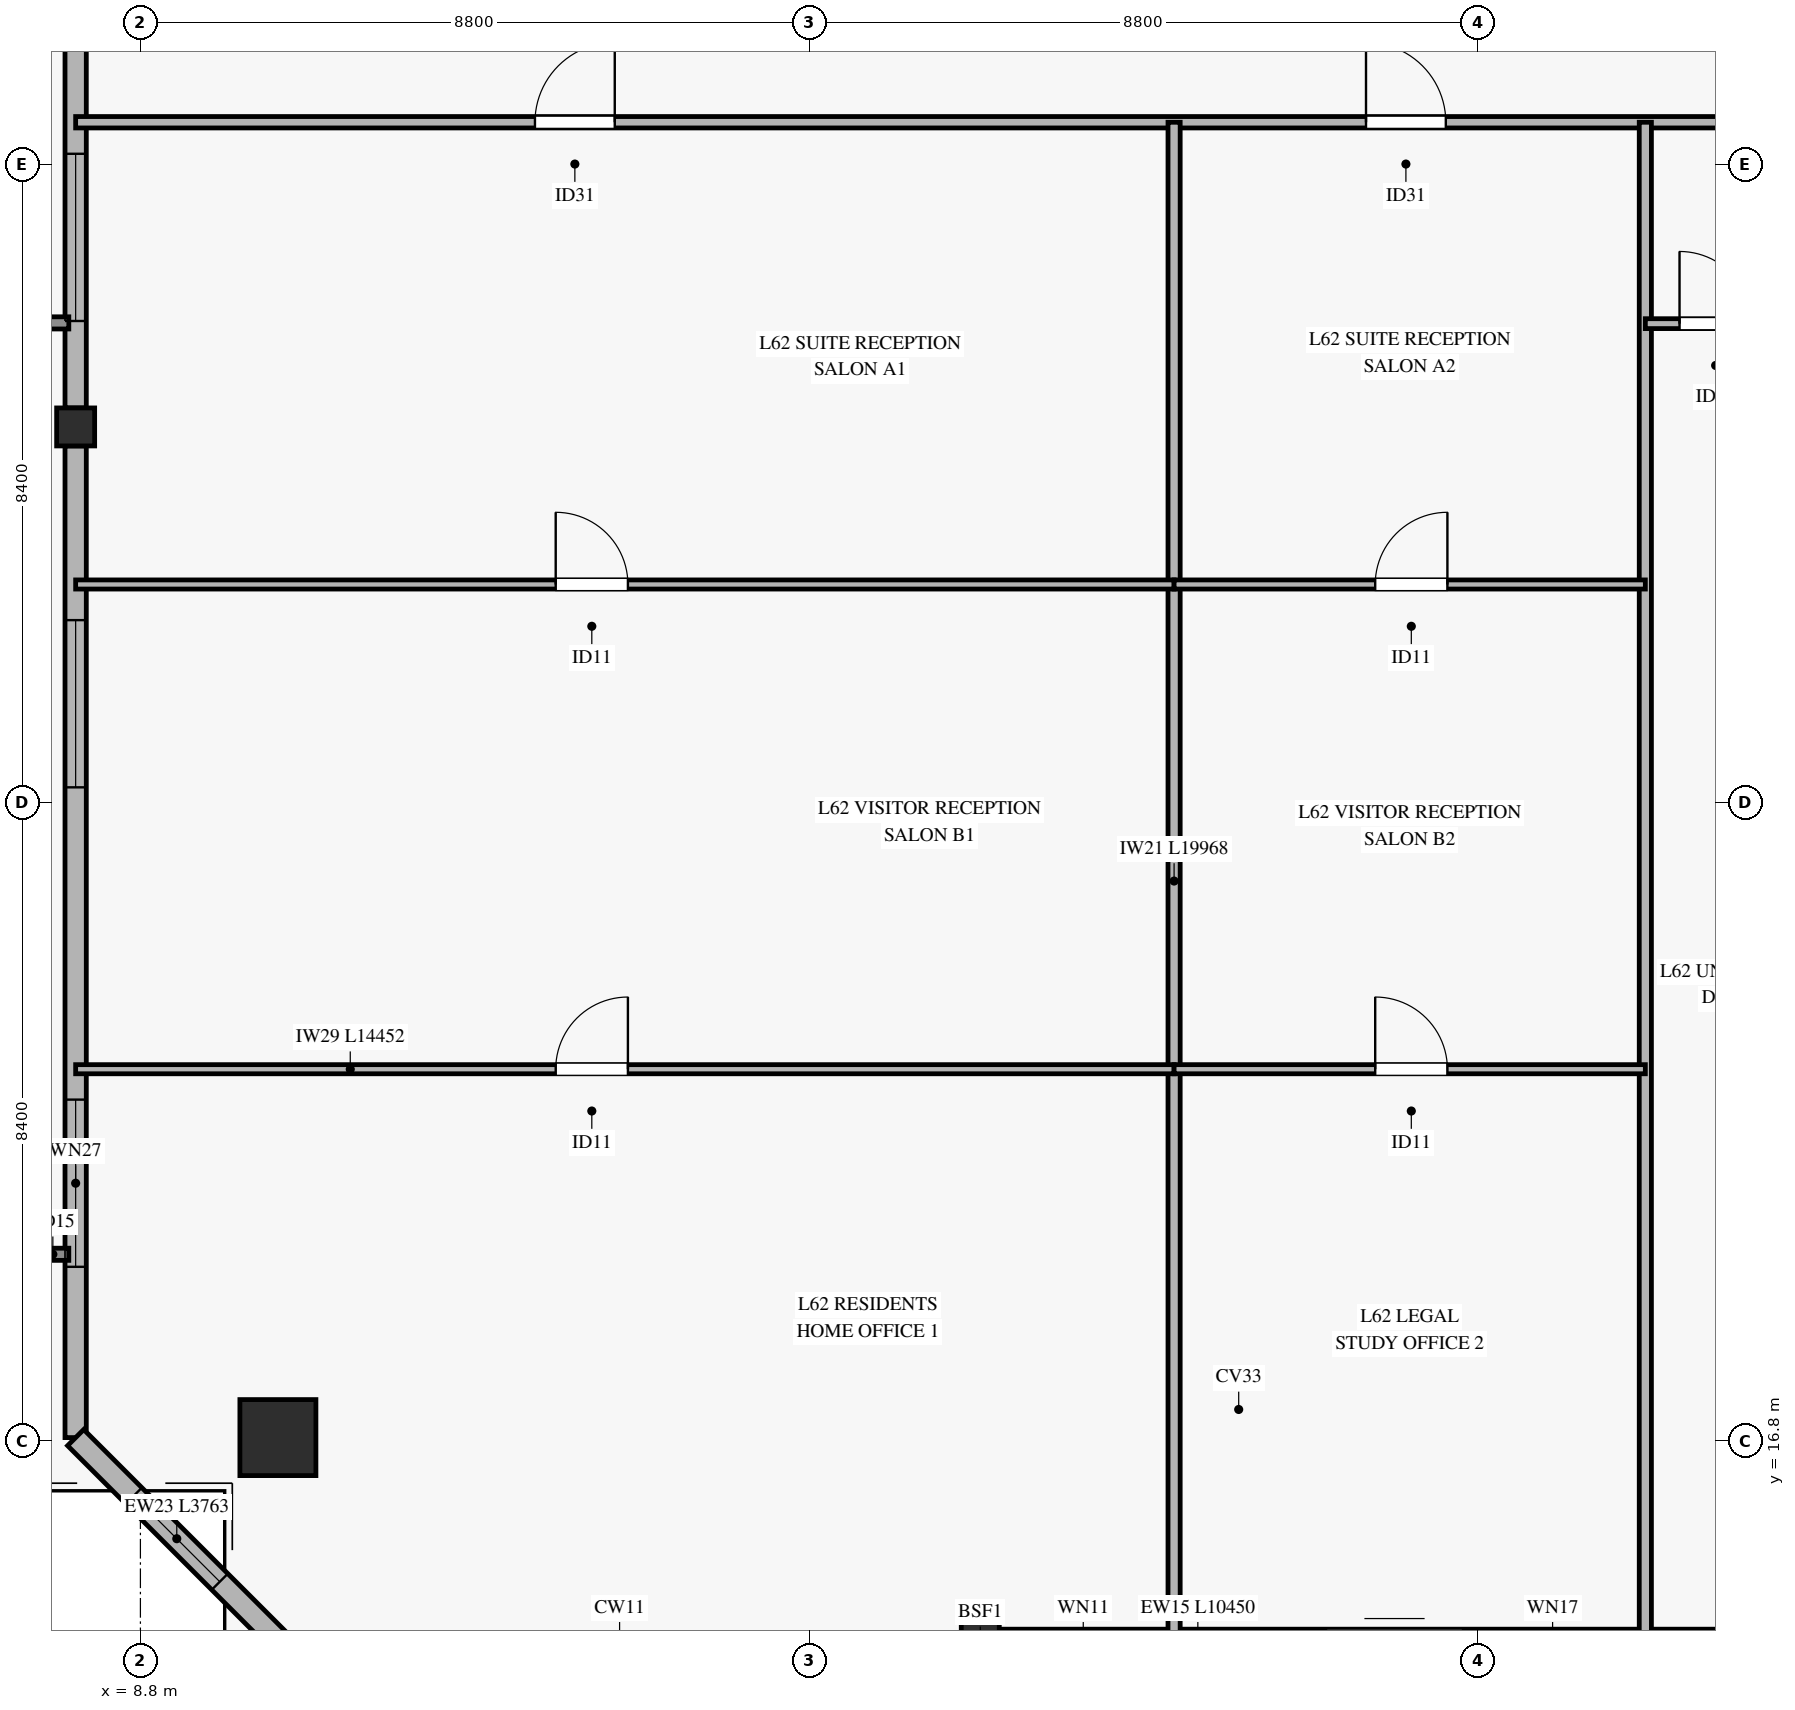
"""IFC4 building model, lengths in metres.
Left out: names, types, materials, properties, quantities, classifications, styles, units other than length and angle.
Written with IfcOpenShell. Run it as: python <this file> out.ifc"""

import sys

from ifc_helpers import new_model, si_unit, direction, frame, frame_2d, origin, origin_2d, place, context, subcontext, project, spatial, rectangle, hollow_rectangle, extrude, source, transform, mapped, element, fill, save


model = new_model("IFC4")
c1 = context("Model", 3, precision=1e-05, world=origin(), true_north=direction((0.0, 1.0)))
c2 = subcontext(c1, "Body", "Model", "MODEL_VIEW")
j1 = project(units=[si_unit("LENGTHUNIT", "METRE"), si_unit("PLANEANGLEUNIT", "RADIAN")], contexts=[c1])
p1 = place(None, origin())
s1 = spatial("IfcSite", under=j1, at=p1, CompositionType="ELEMENT")
p2 = place(p1, origin())
s2 = spatial("IfcBuilding", under=s1, at=p2, CompositionType="ELEMENT")
p3 = place(p2, frame((0.0, 0.0, 245.1)))
s3 = spatial("IfcBuildingStorey", under=s2, at=p3, CompositionType="ELEMENT", Elevation=245.1)
m1 = source(origin(), c2, "Body", "SweptSolid", [
    extrude(hollow_rectangle(XDim=1.0, YDim=1.0, WallThickness=0.045, at=origin_2d()), origin(), (0.0, 0.0, 1.0), 3.326),
])
p4 = place(p3, frame((10.609, 16.843, 0.0), z_axis=(0.111274962345, 0.266076344656, 0.957507838908), x_axis=(-0.922571641766, 0.38582582315, 0.0)))
e1 = element("IfcColumn", 1, at=p4, inside=s3, PredefinedType="COLUMN", context=c2, shape_type="MappedRepresentation", body=[
    mapped(m1, transform((0.0, 0.0, 0.0), x_axis=(1.0, 0.0, 0.0), y_axis=(0.0, 1.0, 0.0), z_axis=(0.0, 0.0, 1.0), scale=1.0)),
])
m2 = source(origin(), c2, "Body", "SweptSolid", [
    extrude(hollow_rectangle(XDim=0.5, YDim=0.5, WallThickness=0.024, at=origin_2d()), origin(), (0.0, 0.0, 1.0), 3.318),
])
p5 = place(p3, frame((19.85, 14.182, 0.0), z_axis=(0.0, 0.280624348342, 0.959817678061), x_axis=(-1.0, 0.0, 0.0)))
e2 = element("IfcColumn", 2, at=p5, inside=s3, PredefinedType="COLUMN", context=c2, shape_type="MappedRepresentation", body=[
    mapped(m2, transform((0.0, 0.0, 0.0), x_axis=(1.0, 0.0, 0.0), y_axis=(0.0, 1.0, 0.0), z_axis=(0.0, 0.0, 1.0), scale=1.0)),
])
m3 = source(origin(), c2, "Body", "SweptSolid", [
    extrude(hollow_rectangle(XDim=0.5, YDim=0.5, WallThickness=0.024, at=origin_2d()), origin(), (0.0, 0.0, 1.0), 3.245),
])
p6 = place(p3, frame((7.948, 30.141, 0.0), z_axis=(0.128183322743, 0.143529213493, 0.981309533554), x_axis=(-0.745854424638, 0.66610898301, 0.0)))
e3 = element("IfcColumn", 3, at=p6, inside=s3, PredefinedType="COLUMN", context=c2, shape_type="MappedRepresentation", body=[
    mapped(m3, transform((0.0, 0.0, 0.0), x_axis=(1.0, 0.0, 0.0), y_axis=(0.0, 1.0, 0.0), z_axis=(0.0, 0.0, 1.0), scale=1.0)),
])
p7 = place(p3, frame((20.1, 14.182, 0.0), z_axis=(0.0, 0.0, 1.0), x_axis=(1.0, 0.0, 0.0)))
e4 = element("IfcWall", 4, at=p7, inside=s3, PredefinedType="SOLIDWALL", context=c2, shape_type="SweptSolid", body=[
    extrude(rectangle(XDim=10.45, YDim=0.28, at=frame_2d((5.225, 0.0))), origin(), (0.0, 0.0, 1.0), 2.815),
])
p8 = place(p7, frame((4.3, 0.0, 0.0)))
e5 = element("IfcOpeningElement", 5, at=p8, cuts=e4, PredefinedType="OPENING", context=c2, shape_type="SweptSolid", body=[
    extrude(rectangle(XDim=1.8, YDim=2.25, at=frame_2d((0.9, 1.125))), frame((0.0, 0.15, 0.0), z_axis=(0.0, -1.0, 0.0), x_axis=(1.0, 0.0, 0.0)), (0.0, 0.0, 1.0), 0.3),
])
p9 = place(p7, frame((0.505, 0.0, 0.45)))
e6 = element("IfcOpeningElement", 6, at=p9, cuts=e4, PredefinedType="OPENING", context=c2, shape_type="SweptSolid", body=[
    extrude(rectangle(XDim=1.2, YDim=2.0, at=frame_2d((0.6, 1.0))), frame((0.0, 0.15, 0.0), z_axis=(0.0, -1.0, 0.0), x_axis=(1.0, 0.0, 0.0)), (0.0, 0.0, 1.0), 0.3),
])
p10 = place(p7, frame((6.48, 0.0, 0.45)))
e7 = element("IfcOpeningElement", 7, at=p10, cuts=e4, PredefinedType="OPENING", context=c2, shape_type="SweptSolid", body=[
    extrude(rectangle(XDim=1.6, YDim=2.0, at=frame_2d((0.8, 1.0))), frame((0.0, 0.15, 0.0), z_axis=(0.0, -1.0, 0.0), x_axis=(1.0, 0.0, 0.0)), (0.0, 0.0, 1.0), 0.3),
])
p11 = place(p3, frame((7.948, 16.843, 0.0), z_axis=(0.0, 0.0, 1.0), x_axis=(0.0, 1.0, 0.0)))
e8 = element("IfcWall", 8, at=p11, inside=s3, PredefinedType="SOLIDWALL", context=c2, shape_type="SweptSolid", body=[
    extrude(rectangle(XDim=13.048, YDim=0.28, at=frame_2d((6.524, 0.0))), origin(), (0.0, 0.0, 1.0), 2.815),
])
p12 = place(p11, frame((2.247, 0.0, 0.45)))
e9 = element("IfcOpeningElement", 9, at=p12, cuts=e8, PredefinedType="OPENING", context=c2, shape_type="SweptSolid", body=[
    extrude(rectangle(XDim=2.2, YDim=2.1, at=frame_2d((1.1, 1.05))), frame((0.0, 0.15, 0.0), z_axis=(0.0, -1.0, 0.0), x_axis=(1.0, 0.0, 0.0)), (0.0, 0.0, 1.0), 0.3),
])
p13 = place(p11, frame((8.556, 0.0, 0.45)))
e10 = element("IfcOpeningElement", 10, at=p13, cuts=e8, PredefinedType="OPENING", context=c2, shape_type="SweptSolid", body=[
    extrude(rectangle(XDim=2.2, YDim=2.1, at=frame_2d((1.1, 1.05))), frame((0.0, 0.15, 0.0), z_axis=(0.0, -1.0, 0.0), x_axis=(1.0, 0.0, 0.0)), (0.0, 0.0, 1.0), 0.3),
])
p14 = place(p3, frame((7.948, 30.391, 0.0), z_axis=(0.0, 0.0, 1.0), x_axis=(0.0, 1.0, 0.0)))
e11 = element("IfcWall", 11, at=p14, inside=s3, PredefinedType="SOLIDWALL", context=c2, shape_type="SweptSolid", body=[
    extrude(rectangle(XDim=13.048, YDim=0.28, at=frame_2d((6.524, 0.0))), origin(), (0.0, 0.0, 1.0), 2.815),
])
p15 = place(p14, frame((1.144, 0.0, 0.45)))
e12 = element("IfcOpeningElement", 12, at=p15, cuts=e11, PredefinedType="OPENING", context=c2, shape_type="SweptSolid", body=[
    extrude(rectangle(XDim=2.2, YDim=2.1, at=frame_2d((1.1, 1.05))), frame((0.0, 0.15, 0.0), z_axis=(0.0, -1.0, 0.0), x_axis=(1.0, 0.0, 0.0)), (0.0, 0.0, 1.0), 0.3),
])
p16 = place(p3, frame((7.948, 16.843, 0.0), z_axis=(0.0, 0.0, 1.0), x_axis=(0.707074342864, -0.707139218021, 0.0)))
e13 = element("IfcWall", 13, at=p16, inside=s3, PredefinedType="SOLIDWALL", context=c2, shape_type="SweptSolid", body=[
    extrude(rectangle(XDim=3.763, YDim=0.3, at=frame_2d((1.882, 0.0))), origin(), (0.0, 0.0, 1.0), 2.815),
])
p17 = place(p16, frame((1.082, 0.0, 0.45)))
e14 = element("IfcOpeningElement", 14, at=p17, cuts=e13, PredefinedType="OPENING", context=c2, shape_type="SweptSolid", body=[
    extrude(rectangle(XDim=1.6, YDim=2.0, at=frame_2d((0.8, 1.0))), frame((0.0, 0.16, 0.0), z_axis=(0.0, -1.0, 0.0), x_axis=(1.0, 0.0, 0.0)), (0.0, 0.0, 1.0), 0.32),
])
p18 = place(p3, frame((7.948, 34.15, 0.0), z_axis=(0.0, 0.0, 1.0), x_axis=(1.0, 0.0, 0.0)))
e15 = element("IfcWall", 15, at=p18, inside=s3, PredefinedType="PARTITIONING", context=c2, shape_type="SweptSolid", body=[
    extrude(rectangle(XDim=54.504, YDim=0.15, at=frame_2d((27.252, 0.0))), origin(), (0.0, 0.0, 1.0), 2.47),
])
p19 = place(p18, frame((6.043, 0.0, 0.0)))
e16 = element("IfcOpeningElement", 16, at=p19, cuts=e15, PredefinedType="OPENING", context=c2, shape_type="SweptSolid", body=[
    extrude(rectangle(XDim=1.05, YDim=2.15, at=frame_2d((0.525, 1.075))), frame((0.0, 0.085, 0.0), z_axis=(0.0, -1.0, 0.0), x_axis=(1.0, 0.0, 0.0)), (0.0, 0.0, 1.0), 0.17),
])
p20 = place(p18, frame((16.977, 0.0, 0.0)))
e17 = element("IfcOpeningElement", 17, at=p20, cuts=e15, PredefinedType="OPENING", context=c2, shape_type="SweptSolid", body=[
    extrude(rectangle(XDim=1.05, YDim=2.15, at=frame_2d((0.525, 1.075))), frame((0.0, 0.085, 0.0), z_axis=(0.0, -1.0, 0.0), x_axis=(1.0, 0.0, 0.0)), (0.0, 0.0, 1.0), 0.17),
])
p21 = place(p18, frame((23.427, 0.0, 0.0)))
e18 = element("IfcOpeningElement", 18, at=p21, cuts=e15, PredefinedType="OPENING", context=c2, shape_type="SweptSolid", body=[
    extrude(rectangle(XDim=1.05, YDim=2.15, at=frame_2d((0.525, 1.075))), frame((0.0, 0.085, 0.0), z_axis=(0.0, -1.0, 0.0), x_axis=(1.0, 0.0, 0.0)), (0.0, 0.0, 1.0), 0.17),
])
p22 = place(p18, frame((29.827, 0.0, 0.0)))
e19 = element("IfcOpeningElement", 19, at=p22, cuts=e15, PredefinedType="OPENING", context=c2, shape_type="SweptSolid", body=[
    extrude(rectangle(XDim=1.05, YDim=2.15, at=frame_2d((0.525, 1.075))), frame((0.0, 0.085, 0.0), z_axis=(0.0, -1.0, 0.0), x_axis=(1.0, 0.0, 0.0)), (0.0, 0.0, 1.0), 0.17),
])
p23 = place(p18, frame((36.927, 0.0, 0.0)))
e20 = element("IfcOpeningElement", 20, at=p23, cuts=e15, PredefinedType="OPENING", context=c2, shape_type="SweptSolid", body=[
    extrude(rectangle(XDim=1.05, YDim=2.15, at=frame_2d((0.525, 1.075))), frame((0.0, 0.085, 0.0), z_axis=(0.0, -1.0, 0.0), x_axis=(1.0, 0.0, 0.0)), (0.0, 0.0, 1.0), 0.17),
])
p24 = place(p18, frame((46.223, 0.0, 0.0)))
e21 = element("IfcOpeningElement", 21, at=p24, cuts=e15, PredefinedType="OPENING", context=c2, shape_type="SweptSolid", body=[
    extrude(rectangle(XDim=1.05, YDim=2.15, at=frame_2d((0.525, 1.075))), frame((0.0, 0.085, 0.0), z_axis=(0.0, -1.0, 0.0), x_axis=(1.0, 0.0, 0.0)), (0.0, 0.0, 1.0), 0.17),
])
for number, where, z_axis, x_axis in (
    (22, (22.4, 14.182, 0.0), (0.0, 0.0, 1.0), (0.0, 1.0, 0.0)),
    (23, (28.6, 14.182, 0.0), (0.0, 0.0, 1.0), (0.0, 1.0, 0.0)),
):
    element("IfcWall", number, at=place(p3, frame(where, z_axis=z_axis, x_axis=x_axis)), inside=s3, PredefinedType="PARTITIONING", context=c2, shape_type="SweptSolid", body=[
        extrude(rectangle(XDim=19.968, YDim=0.16, at=frame_2d((9.984, 0.0))), origin(), (0.0, 0.0, 1.0), 2.77),
    ])
p25 = place(p3, frame((7.948, 21.69, 0.0), z_axis=(0.0, 0.0, 1.0), x_axis=(1.0, 0.0, 0.0)))
e24 = element("IfcWall", 24, at=p25, inside=s3, PredefinedType="PARTITIONING", context=c2, shape_type="SweptSolid", body=[
    extrude(rectangle(XDim=14.452, YDim=0.12, at=frame_2d((7.226, 0.0))), origin(), (0.0, 0.0, 1.0), 2.47),
])
p26 = place(p25, frame((6.316, 0.0, 0.0)))
e25 = element("IfcOpeningElement", 25, at=p26, cuts=e24, PredefinedType="OPENING", context=c2, shape_type="SweptSolid", body=[
    extrude(rectangle(XDim=0.95, YDim=2.1, at=frame_2d((0.475, 1.05))), frame((0.0, 0.07, 0.0), z_axis=(0.0, -1.0, 0.0), x_axis=(1.0, 0.0, 0.0)), (0.0, 0.0, 1.0), 0.14),
])
p27 = place(p3, frame((7.948, 28.068, 0.0), z_axis=(0.0, 0.0, 1.0), x_axis=(1.0, 0.0, 0.0)))
e26 = element("IfcWall", 26, at=p27, inside=s3, PredefinedType="PARTITIONING", context=c2, shape_type="SweptSolid", body=[
    extrude(rectangle(XDim=14.452, YDim=0.12, at=frame_2d((7.226, 0.0))), origin(), (0.0, 0.0, 1.0), 2.47),
])
p28 = place(p27, frame((6.316, 0.0, 0.0)))
e27 = element("IfcOpeningElement", 27, at=p28, cuts=e26, PredefinedType="OPENING", context=c2, shape_type="SweptSolid", body=[
    extrude(rectangle(XDim=0.95, YDim=2.1, at=frame_2d((0.475, 1.05))), frame((0.0, 0.07, 0.0), z_axis=(0.0, -1.0, 0.0), x_axis=(1.0, 0.0, 0.0)), (0.0, 0.0, 1.0), 0.14),
])
p29 = place(p3, frame((22.4, 21.69, 0.0), z_axis=(0.0, 0.0, 1.0), x_axis=(1.0, 0.0, 0.0)))
e28 = element("IfcWall", 28, at=p29, inside=s3, PredefinedType="PARTITIONING", context=c2, shape_type="SweptSolid", body=[
    extrude(rectangle(XDim=6.2, YDim=0.12, at=frame_2d((3.1, 0.0))), origin(), (0.0, 0.0, 1.0), 3.185),
])
p30 = place(p29, frame((2.646, 0.0, 0.0)))
e29 = element("IfcOpeningElement", 29, at=p30, cuts=e28, PredefinedType="OPENING", context=c2, shape_type="SweptSolid", body=[
    extrude(rectangle(XDim=0.95, YDim=2.1, at=frame_2d((0.475, 1.05))), frame((0.0, 0.07, 0.0), z_axis=(0.0, -1.0, 0.0), x_axis=(1.0, 0.0, 0.0)), (0.0, 0.0, 1.0), 0.14),
])
p31 = place(p3, frame((22.4, 28.068, 0.0), z_axis=(0.0, 0.0, 1.0), x_axis=(1.0, 0.0, 0.0)))
e30 = element("IfcWall", 30, at=p31, inside=s3, PredefinedType="PARTITIONING", context=c2, shape_type="SweptSolid", body=[
    extrude(rectangle(XDim=6.2, YDim=0.12, at=frame_2d((3.1, 0.0))), origin(), (0.0, 0.0, 1.0), 3.185),
])
p32 = place(p31, frame((2.646, 0.0, 0.0)))
e31 = element("IfcOpeningElement", 31, at=p32, cuts=e30, PredefinedType="OPENING", context=c2, shape_type="SweptSolid", body=[
    extrude(rectangle(XDim=0.95, YDim=2.1, at=frame_2d((0.475, 1.05))), frame((0.0, 0.07, 0.0), z_axis=(0.0, -1.0, 0.0), x_axis=(1.0, 0.0, 0.0)), (0.0, 0.0, 1.0), 0.14),
])
p33 = place(p3, frame((28.6, 31.5, 0.0), z_axis=(0.0, 0.0, 1.0), x_axis=(1.0, 0.0, 0.0)))
e32 = element("IfcWall", 32, at=p33, inside=s3, PredefinedType="PARTITIONING", context=c2, shape_type="SweptSolid", body=[
    extrude(rectangle(XDim=1.64, YDim=0.13, at=frame_2d((0.82, 0.0))), origin(), (0.0, 0.0, 1.0), 3.185),
])
p34 = place(p33, frame((0.45, 0.0, 0.0)))
e33 = element("IfcOpeningElement", 33, at=p34, cuts=e32, PredefinedType="OPENING", context=c2, shape_type="SweptSolid", body=[
    extrude(rectangle(XDim=0.95, YDim=2.1, at=frame_2d((0.475, 1.05))), frame((0.0, 0.075, 0.0), z_axis=(0.0, -1.0, 0.0), x_axis=(1.0, 0.0, 0.0)), (0.0, 0.0, 1.0), 0.15),
])
m4 = source(origin(), c2, "Body", "SweptSolid", [
    extrude(rectangle(XDim=2.2, YDim=2.1, at=frame_2d((1.1, 1.05))), frame((0.0, 0.03, 0.0), z_axis=(0.0, -1.0, 0.0), x_axis=(1.0, 0.0, 0.0)), (0.0, 0.0, 1.0), 0.06),
])
p35 = place(p12, origin())
e34 = element("IfcWindow", 34, at=p35, inside=s3, PartitioningType="SINGLE_PANEL", PredefinedType="WINDOW", context=c2, shape_type="MappedRepresentation", body=[
    mapped(m4, transform((0.0, 0.0, 0.0), x_axis=(1.0, 0.0, 0.0), y_axis=(0.0, 1.0, 0.0), z_axis=(0.0, 0.0, 1.0), scale=1.0)),
])
fill(e9, e34)
p36 = place(p13, origin())
e35 = element("IfcWindow", 35, at=p36, inside=s3, PartitioningType="SINGLE_PANEL", PredefinedType="WINDOW", context=c2, shape_type="MappedRepresentation", body=[
    mapped(m4, transform((0.0, 0.0, 0.0), x_axis=(1.0, 0.0, 0.0), y_axis=(0.0, 1.0, 0.0), z_axis=(0.0, 0.0, 1.0), scale=1.0)),
])
fill(e10, e35)
p37 = place(p15, origin())
e36 = element("IfcWindow", 36, at=p37, inside=s3, PartitioningType="SINGLE_PANEL", PredefinedType="WINDOW", context=c2, shape_type="MappedRepresentation", body=[
    mapped(m4, transform((0.0, 0.0, 0.0), x_axis=(1.0, 0.0, 0.0), y_axis=(0.0, 1.0, 0.0), z_axis=(0.0, 0.0, 1.0), scale=1.0)),
])
fill(e12, e36)
m5 = source(origin(), c2, "Body", "SweptSolid", [
    extrude(rectangle(XDim=1.6, YDim=2.0, at=frame_2d((0.8, 1.0))), frame((0.0, 0.03, 0.0), z_axis=(0.0, -1.0, 0.0), x_axis=(1.0, 0.0, 0.0)), (0.0, 0.0, 1.0), 0.06),
])
p38 = place(p17, origin())
e37 = element("IfcWindow", 37, at=p38, inside=s3, PartitioningType="SINGLE_PANEL", PredefinedType="WINDOW", context=c2, shape_type="MappedRepresentation", body=[
    mapped(m5, transform((0.0, 0.0, 0.0), x_axis=(1.0, 0.0, 0.0), y_axis=(0.0, 1.0, 0.0), z_axis=(0.0, 0.0, 1.0), scale=1.0)),
])
fill(e14, e37)
m6 = source(origin(), c2, "Body", "SweptSolid", [
    extrude(rectangle(XDim=1.05, YDim=2.15, at=frame_2d((0.525, 1.075))), frame((0.0, 0.025, 0.0), z_axis=(0.0, -1.0, 0.0), x_axis=(1.0, 0.0, 0.0)), (0.0, 0.0, 1.0), 0.05),
])
p39 = place(p19, origin())
e38 = element("IfcDoor", 38, at=p39, inside=s3, OperationType="SINGLE_SWING_RIGHT", PredefinedType="DOOR", context=c2, shape_type="MappedRepresentation", body=[
    mapped(m6, transform((0.0, 0.0, 0.0), x_axis=(1.0, 0.0, 0.0), y_axis=(0.0, 1.0, 0.0), z_axis=(0.0, 0.0, 1.0), scale=1.0)),
])
fill(e16, e38)
m7 = source(origin(), c2, "Body", "SweptSolid", [
    extrude(rectangle(XDim=0.95, YDim=2.1, at=frame_2d((0.475, 1.05))), frame((0.0, 0.025, 0.0), z_axis=(0.0, -1.0, 0.0), x_axis=(1.0, 0.0, 0.0)), (0.0, 0.0, 1.0), 0.05),
])
p40 = place(p28, origin())
e39 = element("IfcDoor", 39, at=p40, inside=s3, OperationType="SINGLE_SWING_LEFT", PredefinedType="DOOR", context=c2, shape_type="MappedRepresentation", body=[
    mapped(m7, transform((0.0, 0.0, 0.0), x_axis=(1.0, 0.0, 0.0), y_axis=(0.0, 1.0, 0.0), z_axis=(0.0, 0.0, 1.0), scale=1.0)),
])
fill(e27, e39)
p41 = place(p26, origin())
e40 = element("IfcDoor", 40, at=p41, inside=s3, OperationType="SINGLE_SWING_RIGHT", PredefinedType="DOOR", context=c2, shape_type="MappedRepresentation", body=[
    mapped(m7, transform((0.0, 0.0, 0.0), x_axis=(1.0, 0.0, 0.0), y_axis=(0.0, 1.0, 0.0), z_axis=(0.0, 0.0, 1.0), scale=1.0)),
])
fill(e25, e40)
p42 = place(p20, origin())
e41 = element("IfcDoor", 41, at=p42, inside=s3, OperationType="SINGLE_SWING_LEFT", PredefinedType="DOOR", context=c2, shape_type="MappedRepresentation", body=[
    mapped(m6, transform((0.0, 0.0, 0.0), x_axis=(1.0, 0.0, 0.0), y_axis=(0.0, 1.0, 0.0), z_axis=(0.0, 0.0, 1.0), scale=1.0)),
])
fill(e17, e41)
p43 = place(p32, origin())
e42 = element("IfcDoor", 42, at=p43, inside=s3, OperationType="SINGLE_SWING_RIGHT", PredefinedType="DOOR", context=c2, shape_type="MappedRepresentation", body=[
    mapped(m7, transform((0.0, 0.0, 0.0), x_axis=(1.0, 0.0, 0.0), y_axis=(0.0, 1.0, 0.0), z_axis=(0.0, 0.0, 1.0), scale=1.0)),
])
fill(e31, e42)
p44 = place(p30, origin())
e43 = element("IfcDoor", 43, at=p44, inside=s3, OperationType="SINGLE_SWING_LEFT", PredefinedType="DOOR", context=c2, shape_type="MappedRepresentation", body=[
    mapped(m7, transform((0.0, 0.0, 0.0), x_axis=(1.0, 0.0, 0.0), y_axis=(0.0, 1.0, 0.0), z_axis=(0.0, 0.0, 1.0), scale=1.0)),
])
fill(e29, e43)
p45 = place(p34, origin())
e44 = element("IfcDoor", 44, at=p45, inside=s3, OperationType="SINGLE_SWING_LEFT", PredefinedType="DOOR", context=c2, shape_type="MappedRepresentation", body=[
    mapped(m7, transform((0.0, 0.0, 0.0), x_axis=(1.0, 0.0, 0.0), y_axis=(0.0, 1.0, 0.0), z_axis=(0.0, 0.0, 1.0), scale=1.0)),
])
fill(e33, e44)
save(model, sys.argv[1])
